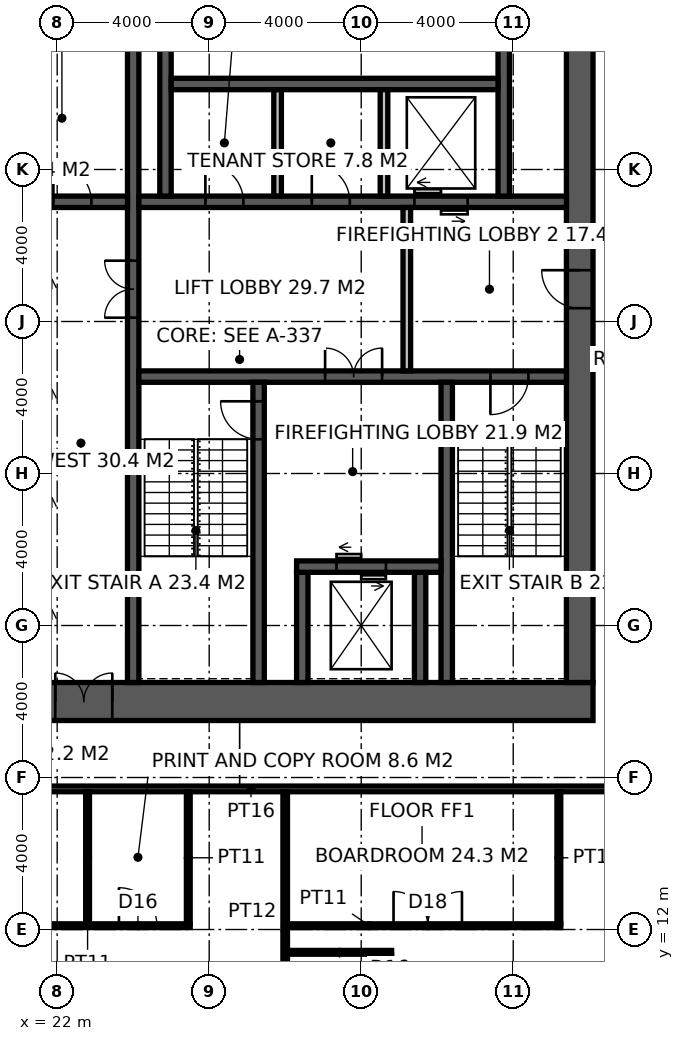
"""IFC4 building model, lengths in metres.
Left out: names, types, materials, properties, quantities, classifications, styles, units other than length and angle.
Written with IfcOpenShell. Run it as: python <this file> out.ifc"""

import sys

from ifc_helpers import new_model, si_unit, direction, frame, frame_2d, origin, place, context, subcontext, project, spatial, rectangle, extrude, element, fill, save


model = new_model("IFC4")
c1 = context("Model", 3, precision=1e-05, world=origin(), true_north=direction((0.0, 1.0)))
c2 = subcontext(c1, "Body", "Model", "MODEL_VIEW")
j1 = project(units=[si_unit("LENGTHUNIT", "METRE"), si_unit("PLANEANGLEUNIT", "RADIAN")], contexts=[c1])
p1 = place(None, origin())
s1 = spatial("IfcSite", under=j1, at=p1, CompositionType="ELEMENT")
p2 = place(p1, origin())
s2 = spatial("IfcBuilding", under=s1, at=p2, CompositionType="ELEMENT")
p3 = place(p2, frame((0.0, 0.0, 234.2)))
s3 = spatial("IfcBuildingStorey", under=s2, at=p3, CompositionType="ELEMENT", Elevation=234.2)
p4 = place(p3, frame((18.5, 18.0, -0.15), z_axis=(0.0, 0.0, 1.0), x_axis=(1.0, 0.0, 0.0)))
e1 = element("IfcWall", 1, at=p4, inside=s3, PredefinedType="SHEAR", context=c2, shape_type="SweptSolid", body=[
    extrude(rectangle(XDim=17.6, YDim=1.0, at=frame_2d((8.8, 0.0))), origin(), (0.0, 0.0, 1.0), 4.0),
])
p5 = place(p4, frame((3.45, 0.0, 0.15)))
e2 = element("IfcOpeningElement", 2, at=p5, cuts=e1, PredefinedType="OPENING", context=c2, shape_type="SweptSolid", body=[
    extrude(rectangle(XDim=1.5, YDim=2.4, at=frame_2d((0.75, 1.2))), frame((0.0, 0.51, 0.0), z_axis=(0.0, -1.0, 0.0), x_axis=(1.0, 0.0, 0.0)), (0.0, 0.0, 1.0), 1.02),
])
p6 = place(p3, frame((35.75, 18.5, -0.15), z_axis=(0.0, 0.0, 1.0), x_axis=(0.0, 1.0, 0.0)))
e3 = element("IfcWall", 3, at=p6, inside=s3, PredefinedType="SHEAR", context=c2, shape_type="SweptSolid", body=[
    extrude(rectangle(XDim=17.0, YDim=0.7, at=frame_2d((8.5, 0.0))), origin(), (0.0, 0.0, 1.0), 4.0),
])
p7 = place(p6, frame((9.85, 0.0, 0.15)))
e4 = element("IfcOpeningElement", 4, at=p7, cuts=e3, PredefinedType="OPENING", context=c2, shape_type="SweptSolid", body=[
    extrude(rectangle(XDim=1.0, YDim=2.2, at=frame_2d((0.5, 1.1))), frame((0.0, 0.36, 0.0), z_axis=(0.0, -1.0, 0.0), x_axis=(1.0, 0.0, 0.0)), (0.0, 0.0, 1.0), 0.72),
])
p8 = place(p3, frame((24.0, 18.5, -0.15), z_axis=(0.0, 0.0, 1.0), x_axis=(0.0, 1.0, 0.0)))
e5 = element("IfcWall", 5, at=p8, inside=s3, PredefinedType="SHEAR", context=c2, shape_type="SweptSolid", body=[
    extrude(rectangle(XDim=17.0, YDim=0.3, at=frame_2d((8.5, 0.0))), origin(), (0.0, 0.0, 1.0), 4.0),
])
p9 = place(p8, frame((9.6, 0.0, 0.15)))
e6 = element("IfcOpeningElement", 6, at=p9, cuts=e5, PredefinedType="OPENING", context=c2, shape_type="SweptSolid", body=[
    extrude(rectangle(XDim=1.5, YDim=2.4, at=frame_2d((0.75, 1.2))), frame((0.0, 0.16, 0.0), z_axis=(0.0, -1.0, 0.0), x_axis=(1.0, 0.0, 0.0)), (0.0, 0.0, 1.0), 0.32),
])
p10 = place(p3, frame((24.15, 26.55, -0.15), z_axis=(0.0, 0.0, 1.0), x_axis=(1.0, 0.0, 0.0)))
e7 = element("IfcWall", 7, at=p10, inside=s3, PredefinedType="SHEAR", context=c2, shape_type="SweptSolid", body=[
    extrude(rectangle(XDim=11.25, YDim=0.3, at=frame_2d((5.625, 0.0))), origin(), (0.0, 0.0, 1.0), 4.0),
])
p11 = place(p10, frame((9.25, 0.0, 0.15)))
e8 = element("IfcOpeningElement", 8, at=p11, cuts=e7, PredefinedType="OPENING", context=c2, shape_type="SweptSolid", body=[
    extrude(rectangle(XDim=1.0, YDim=2.2, at=frame_2d((0.5, 1.1))), frame((0.0, 0.16, 0.0), z_axis=(0.0, -1.0, 0.0), x_axis=(1.0, 0.0, 0.0)), (0.0, 0.0, 1.0), 0.32),
])
p12 = place(p10, frame((4.9, 0.0, 0.15)))
e9 = element("IfcOpeningElement", 9, at=p12, cuts=e7, PredefinedType="OPENING", context=c2, shape_type="SweptSolid", body=[
    extrude(rectangle(XDim=1.5, YDim=2.4, at=frame_2d((0.75, 1.2))), frame((0.0, 0.16, 0.0), z_axis=(0.0, -1.0, 0.0), x_axis=(1.0, 0.0, 0.0)), (0.0, 0.0, 1.0), 0.32),
])
p13 = place(p3, frame((27.3, 18.5, -0.15), z_axis=(0.0, 0.0, 1.0), x_axis=(0.0, 1.0, 0.0)))
e10 = element("IfcWall", 10, at=p13, inside=s3, PredefinedType="SHEAR", context=c2, shape_type="SweptSolid", body=[
    extrude(rectangle(XDim=7.9, YDim=0.3, at=frame_2d((3.95, 0.0))), origin(), (0.0, 0.0, 1.0), 4.0),
])
p14 = place(p13, frame((6.4, 0.0, 0.15)))
e11 = element("IfcOpeningElement", 11, at=p14, cuts=e10, PredefinedType="OPENING", context=c2, shape_type="SweptSolid", body=[
    extrude(rectangle(XDim=1.0, YDim=2.2, at=frame_2d((0.5, 1.1))), frame((0.0, 0.16, 0.0), z_axis=(0.0, -1.0, 0.0), x_axis=(1.0, 0.0, 0.0)), (0.0, 0.0, 1.0), 0.32),
])
p15 = place(p3, frame((32.25, 18.5, -0.15), z_axis=(0.0, 0.0, 1.0), x_axis=(0.0, 1.0, 0.0)))
e12 = element("IfcWall", 12, at=p15, inside=s3, PredefinedType="SHEAR", context=c2, shape_type="SweptSolid", body=[
    extrude(rectangle(XDim=7.9, YDim=0.3, at=frame_2d((3.95, 0.0))), origin(), (0.0, 0.0, 1.0), 4.0),
])
for number, where, z_axis, x_axis in (
    (13, (28.45, 18.5, -0.15), (0.0, 0.0, 1.0), (0.0, 1.0, 0.0)),
    (14, (31.55, 18.5, -0.15), (0.0, 0.0, 1.0), (0.0, 1.0, 0.0)),
):
    element("IfcWall", number, at=place(p3, frame(where, z_axis=z_axis, x_axis=x_axis)), inside=s3, PredefinedType="SHEAR", context=c2, shape_type="SweptSolid", body=[
        extrude(rectangle(XDim=2.9, YDim=0.3, at=frame_2d((1.45, 0.0))), origin(), (0.0, 0.0, 1.0), 4.0),
    ])
p16 = place(p3, frame((28.3, 21.55, -0.15), z_axis=(0.0, 0.0, 1.0), x_axis=(1.0, 0.0, 0.0)))
e15 = element("IfcWall", 15, at=p16, inside=s3, PredefinedType="SHEAR", context=c2, shape_type="SweptSolid", body=[
    extrude(rectangle(XDim=3.8, YDim=0.3, at=frame_2d((1.9, 0.0))), origin(), (0.0, 0.0, 1.0), 4.0),
])
p17 = place(p16, frame((1.05, 0.0, 0.15)))
e16 = element("IfcOpeningElement", 16, at=p17, cuts=e15, PredefinedType="OPENING", context=c2, shape_type="SweptSolid", body=[
    extrude(rectangle(XDim=1.3, YDim=2.4, at=frame_2d((0.65, 1.2))), frame((0.0, 0.16, 0.0), z_axis=(0.0, -1.0, 0.0), x_axis=(1.0, 0.0, 0.0)), (0.0, 0.0, 1.0), 0.32),
])
p18 = place(p3, frame((24.15, 31.15, -0.15), z_axis=(0.0, 0.0, 1.0), x_axis=(1.0, 0.0, 0.0)))
e17 = element("IfcWall", 17, at=p18, inside=s3, PredefinedType="SHEAR", context=c2, shape_type="SweptSolid", body=[
    extrude(rectangle(XDim=11.25, YDim=0.3, at=frame_2d((5.625, 0.0))), origin(), (0.0, 0.0, 1.0), 4.0),
])
p19 = place(p18, frame((1.75, 0.0, 0.15)))
e18 = element("IfcOpeningElement", 18, at=p19, cuts=e17, PredefinedType="OPENING", context=c2, shape_type="SweptSolid", body=[
    extrude(rectangle(XDim=1.0, YDim=2.2, at=frame_2d((0.5, 1.1))), frame((0.0, 0.16, 0.0), z_axis=(0.0, -1.0, 0.0), x_axis=(1.0, 0.0, 0.0)), (0.0, 0.0, 1.0), 0.32),
])
p20 = place(p18, frame((4.55, 0.0, 0.15)))
e19 = element("IfcOpeningElement", 19, at=p20, cuts=e17, PredefinedType="OPENING", context=c2, shape_type="SweptSolid", body=[
    extrude(rectangle(XDim=1.0, YDim=2.2, at=frame_2d((0.5, 1.1))), frame((0.0, 0.16, 0.0), z_axis=(0.0, -1.0, 0.0), x_axis=(1.0, 0.0, 0.0)), (0.0, 0.0, 1.0), 0.32),
])
p21 = place(p18, frame((7.25, 0.0, 0.15)))
e20 = element("IfcOpeningElement", 20, at=p21, cuts=e17, PredefinedType="OPENING", context=c2, shape_type="SweptSolid", body=[
    extrude(rectangle(XDim=1.4, YDim=2.4, at=frame_2d((0.7, 1.2))), frame((0.0, 0.16, 0.0), z_axis=(0.0, -1.0, 0.0), x_axis=(1.0, 0.0, 0.0)), (0.0, 0.0, 1.0), 0.32),
])
p22 = place(p3, frame((18.5, 31.15, -0.15), z_axis=(0.0, 0.0, 1.0), x_axis=(1.0, 0.0, 0.0)))
e21 = element("IfcWall", 21, at=p22, inside=s3, PredefinedType="SHEAR", context=c2, shape_type="SweptSolid", body=[
    extrude(rectangle(XDim=5.35, YDim=0.3, at=frame_2d((2.675, 0.0))), origin(), (0.0, 0.0, 1.0), 4.0),
])
p23 = place(p22, frame((3.4, 0.0, 0.15)))
e22 = element("IfcOpeningElement", 22, at=p23, cuts=e21, PredefinedType="OPENING", context=c2, shape_type="SweptSolid", body=[
    extrude(rectangle(XDim=1.0, YDim=2.2, at=frame_2d((0.5, 1.1))), frame((0.0, 0.16, 0.0), z_axis=(0.0, -1.0, 0.0), x_axis=(1.0, 0.0, 0.0)), (0.0, 0.0, 1.0), 0.32),
])
for number, where, z_axis, x_axis in (
    (23, (24.85, 31.3, -0.15), (0.0, 0.0, 1.0), (0.0, 1.0, 0.0)),
    (24, (33.75, 31.3, -0.15), (0.0, 0.0, 1.0), (0.0, 1.0, 0.0)),
):
    element("IfcWall", number, at=place(p3, frame(where, z_axis=z_axis, x_axis=x_axis)), inside=s3, PredefinedType="SHEAR", context=c2, shape_type="SweptSolid", body=[
        extrude(rectangle(XDim=4.2, YDim=0.3, at=frame_2d((2.1, 0.0))), origin(), (0.0, 0.0, 1.0), 4.0),
    ])
p24 = place(p3, frame((25.0, 34.25, -0.15), z_axis=(0.0, 0.0, 1.0), x_axis=(1.0, 0.0, 0.0)))
e25 = element("IfcWall", 25, at=p24, inside=s3, PredefinedType="SHEAR", context=c2, shape_type="SweptSolid", body=[
    extrude(rectangle(XDim=8.6, YDim=0.3, at=frame_2d((4.3, 0.0))), origin(), (0.0, 0.0, 1.0), 4.0),
])
for number, where, z_axis, x_axis in (
    (26, (27.8, 31.3, -0.15), (0.0, 0.0, 1.0), (0.0, 1.0, 0.0)),
    (27, (30.6, 31.3, -0.15), (0.0, 0.0, 1.0), (0.0, 1.0, 0.0)),
):
    element("IfcWall", number, at=place(p3, frame(where, z_axis=z_axis, x_axis=x_axis)), inside=s3, PredefinedType="SOLIDWALL", context=c2, shape_type="SweptSolid", body=[
        extrude(rectangle(XDim=2.8, YDim=0.2, at=frame_2d((1.4, 0.0))), origin(), (0.0, 0.0, 1.0), 4.0),
    ])
p25 = place(p3, frame((31.2, 26.7, 0.0), z_axis=(0.0, 0.0, 1.0), x_axis=(0.0, 1.0, 0.0)))
e28 = element("IfcWall", 28, at=p25, inside=s3, PredefinedType="SOLIDWALL", context=c2, shape_type="SweptSolid", body=[
    extrude(rectangle(XDim=4.3, YDim=0.2, at=frame_2d((2.15, 0.0))), origin(), (0.0, 0.0, 1.0), 3.85),
])
p26 = place(p3, frame((15.775, 15.7, 0.0), z_axis=(0.0, 0.0, 1.0), x_axis=(1.0, 0.0, 0.0)))
e29 = element("IfcWall", 29, at=p26, inside=s3, PredefinedType="PARTITIONING", context=c2, shape_type="SweptSolid", body=[
    extrude(rectangle(XDim=22.65, YDim=0.15, at=frame_2d((11.325, 0.0))), origin(), (0.0, 0.0, 1.0), 3.85),
])
p27 = place(p3, frame((28.0, 8.3, 0.0), z_axis=(0.0, 0.0, 1.0), x_axis=(0.0, 1.0, 0.0)))
e30 = element("IfcWall", 30, at=p27, inside=s3, PredefinedType="PARTITIONING", context=c2, shape_type="SweptSolid", body=[
    extrude(rectangle(XDim=7.325, YDim=0.12, at=frame_2d((3.663, 0.0))), origin(), (0.0, 0.0, 1.0), 3.85),
])
p28 = place(p3, frame((28.06, 11.4, 0.0), z_axis=(0.0, 0.0, 1.0), x_axis=(1.0, 0.0, 0.0)))
e31 = element("IfcWall", 31, at=p28, inside=s3, PredefinedType="PARTITIONING", context=c2, shape_type="SweptSolid", body=[
    extrude(rectangle(XDim=2.74, YDim=0.1, at=frame_2d((1.37, 0.0))), origin(), (0.0, 0.0, 1.0), 3.85),
])
p29 = place(p3, frame((15.65, 12.1, 0.0), z_axis=(0.0, 0.0, 1.0), x_axis=(1.0, 0.0, 0.0)))
e32 = element("IfcWall", 32, at=p29, inside=s3, PredefinedType="PARTITIONING", context=c2, shape_type="SweptSolid", body=[
    extrude(rectangle(XDim=9.85, YDim=0.1, at=frame_2d((4.925, 0.0))), origin(), (0.0, 0.0, 1.0), 3.85),
])
p30 = place(p29, frame((1.4, 0.0, 0.0)))
e33 = element("IfcOpeningElement", 33, at=p30, cuts=e32, PredefinedType="OPENING", context=c2, shape_type="SweptSolid", body=[
    extrude(rectangle(XDim=1.0, YDim=2.2, at=frame_2d((0.5, 1.1))), frame((0.0, 0.06, 0.0), z_axis=(0.0, -1.0, 0.0), x_axis=(1.0, 0.0, 0.0)), (0.0, 0.0, 1.0), 0.12),
])
p31 = place(p29, frame((4.95, 0.0, 0.0)))
e34 = element("IfcOpeningElement", 34, at=p31, cuts=e32, PredefinedType="OPENING", context=c2, shape_type="SweptSolid", body=[
    extrude(rectangle(XDim=1.0, YDim=2.2, at=frame_2d((0.5, 1.1))), frame((0.0, 0.06, 0.0), z_axis=(0.0, -1.0, 0.0), x_axis=(1.0, 0.0, 0.0)), (0.0, 0.0, 1.0), 0.12),
])
p32 = place(p29, frame((7.975, 0.0, 0.0)))
e35 = element("IfcOpeningElement", 35, at=p32, cuts=e32, PredefinedType="OPENING", context=c2, shape_type="SweptSolid", body=[
    extrude(rectangle(XDim=1.0, YDim=2.2, at=frame_2d((0.5, 1.1))), frame((0.0, 0.06, 0.0), z_axis=(0.0, -1.0, 0.0), x_axis=(1.0, 0.0, 0.0)), (0.0, 0.0, 1.0), 0.12),
])
p33 = place(p3, frame((28.061, 12.1, 0.0), z_axis=(0.0, 0.0, 1.0), x_axis=(1.0, 0.0, 0.0)))
e36 = element("IfcWall", 36, at=p33, inside=s3, PredefinedType="PARTITIONING", context=c2, shape_type="SweptSolid", body=[
    extrude(rectangle(XDim=7.19, YDim=0.1, at=frame_2d((3.595, 0.0))), origin(), (0.0, 0.0, 1.0), 3.85),
])
p34 = place(p33, frame((2.79, 0.0, 0.0)))
e37 = element("IfcOpeningElement", 37, at=p34, cuts=e36, PredefinedType="OPENING", context=c2, shape_type="SweptSolid", body=[
    extrude(rectangle(XDim=1.8, YDim=2.4, at=frame_2d((0.9, 1.2))), frame((0.0, 0.06, 0.0), z_axis=(0.0, -1.0, 0.0), x_axis=(1.0, 0.0, 0.0)), (0.0, 0.0, 1.0), 0.12),
])
p35 = place(p3, frame((22.8, 12.15, 0.0), z_axis=(0.0, 0.0, 1.0), x_axis=(0.0, 1.0, 0.0)))
e38 = element("IfcWall", 38, at=p35, inside=s3, PredefinedType="PARTITIONING", context=c2, shape_type="SweptSolid", body=[
    extrude(rectangle(XDim=3.475, YDim=0.1, at=frame_2d((1.738, 0.0))), origin(), (0.0, 0.0, 1.0), 3.85),
])
p36 = place(p3, frame((25.45, 12.15, 0.0), z_axis=(0.0, 0.0, 1.0), x_axis=(0.0, 1.0, 0.0)))
e39 = element("IfcWall", 39, at=p36, inside=s3, PredefinedType="PARTITIONING", context=c2, shape_type="SweptSolid", body=[
    extrude(rectangle(XDim=3.475, YDim=0.1, at=frame_2d((1.738, 0.0))), origin(), (0.0, 0.0, 1.0), 2.65),
])
p37 = place(p3, frame((30.75, 8.3, 0.0), z_axis=(0.0, 0.0, 1.0), x_axis=(0.0, 1.0, 0.0)))
e40 = element("IfcWall", 40, at=p37, inside=s3, PredefinedType="PARTITIONING", context=c2, shape_type="SweptSolid", body=[
    extrude(rectangle(XDim=3.05, YDim=0.1, at=frame_2d((1.525, 0.0))), origin(), (0.0, 0.0, 1.0), 3.85),
])
p38 = place(p37, frame((1.05, 0.0, 0.0)))
e41 = element("IfcOpeningElement", 41, at=p38, cuts=e40, PredefinedType="OPENING", context=c2, shape_type="SweptSolid", body=[
    extrude(rectangle(XDim=1.0, YDim=2.2, at=frame_2d((0.5, 1.1))), frame((0.0, 0.06, 0.0), z_axis=(0.0, -1.0, 0.0), x_axis=(1.0, 0.0, 0.0)), (0.0, 0.0, 1.0), 0.12),
])
p39 = place(p3, frame((35.201, 12.15, 0.0), z_axis=(0.0, 0.0, 1.0), x_axis=(0.0, 1.0, 0.0)))
e42 = element("IfcWall", 42, at=p39, inside=s3, PredefinedType="PARTITIONING", context=c2, shape_type="SweptSolid", body=[
    extrude(rectangle(XDim=3.475, YDim=0.1, at=frame_2d((1.738, 0.0))), origin(), (0.0, 0.0, 1.0), 3.85),
])
p40 = place(p14, origin())
e43 = element("IfcDoor", 43, at=p40, inside=s3, OperationType="SINGLE_SWING_RIGHT", PredefinedType="DOOR", context=c2, shape_type="SweptSolid", body=[
    extrude(rectangle(XDim=1.0, YDim=2.2, at=frame_2d((0.5, 1.1))), frame((0.0, 0.025, 0.0), z_axis=(0.0, -1.0, 0.0), x_axis=(1.0, 0.0, 0.0)), (0.0, 0.0, 1.0), 0.05),
])
fill(e11, e43)
p41 = place(p11, frame((1.0, 0.0, 0.0), z_axis=(0.0, 0.0, 1.0), x_axis=(-1.0, 0.0, 0.0)))
e44 = element("IfcDoor", 44, at=p41, inside=s3, OperationType="SINGLE_SWING_RIGHT", PredefinedType="DOOR", context=c2, shape_type="SweptSolid", body=[
    extrude(rectangle(XDim=1.0, YDim=2.2, at=frame_2d((0.5, 1.1))), frame((0.0, 0.025, 0.0), z_axis=(0.0, -1.0, 0.0), x_axis=(1.0, 0.0, 0.0)), (0.0, 0.0, 1.0), 0.05),
])
fill(e8, e44)
p42 = place(p7, origin())
e45 = element("IfcDoor", 45, at=p42, inside=s3, OperationType="SINGLE_SWING_RIGHT", PredefinedType="DOOR", context=c2, shape_type="SweptSolid", body=[
    extrude(rectangle(XDim=1.0, YDim=2.2, at=frame_2d((0.5, 1.1))), frame((0.0, 0.025, 0.0), z_axis=(0.0, -1.0, 0.0), x_axis=(1.0, 0.0, 0.0)), (0.0, 0.0, 1.0), 0.05),
])
fill(e4, e45)
p43 = place(p12, origin())
e46 = element("IfcDoor", 46, at=p43, inside=s3, OperationType="DOUBLE_DOOR_DOUBLE_SWING", PredefinedType="DOOR", context=c2, shape_type="SweptSolid", body=[
    extrude(rectangle(XDim=1.5, YDim=2.4, at=frame_2d((0.75, 1.2))), frame((0.0, 0.025, 0.0), z_axis=(0.0, -1.0, 0.0), x_axis=(1.0, 0.0, 0.0)), (0.0, 0.0, 1.0), 0.05),
])
fill(e9, e46)
p44 = place(p9, origin())
e47 = element("IfcDoor", 47, at=p44, inside=s3, OperationType="DOUBLE_DOOR_DOUBLE_SWING", PredefinedType="DOOR", context=c2, shape_type="SweptSolid", body=[
    extrude(rectangle(XDim=1.5, YDim=2.4, at=frame_2d((0.75, 1.2))), frame((0.0, 0.025, 0.0), z_axis=(0.0, -1.0, 0.0), x_axis=(1.0, 0.0, 0.0)), (0.0, 0.0, 1.0), 0.05),
])
fill(e6, e47)
p45 = place(p23, origin())
e48 = element("IfcDoor", 48, at=p45, inside=s3, OperationType="SINGLE_SWING_LEFT", PredefinedType="DOOR", context=c2, shape_type="SweptSolid", body=[
    extrude(rectangle(XDim=1.0, YDim=2.2, at=frame_2d((0.5, 1.1))), frame((0.0, 0.025, 0.0), z_axis=(0.0, -1.0, 0.0), x_axis=(1.0, 0.0, 0.0)), (0.0, 0.0, 1.0), 0.05),
])
fill(e22, e48)
p46 = place(p19, origin())
e49 = element("IfcDoor", 49, at=p46, inside=s3, OperationType="SINGLE_SWING_LEFT", PredefinedType="DOOR", context=c2, shape_type="SweptSolid", body=[
    extrude(rectangle(XDim=1.0, YDim=2.2, at=frame_2d((0.5, 1.1))), frame((0.0, 0.025, 0.0), z_axis=(0.0, -1.0, 0.0), x_axis=(1.0, 0.0, 0.0)), (0.0, 0.0, 1.0), 0.05),
])
fill(e18, e49)
p47 = place(p20, origin())
e50 = element("IfcDoor", 50, at=p47, inside=s3, OperationType="SINGLE_SWING_LEFT", PredefinedType="DOOR", context=c2, shape_type="SweptSolid", body=[
    extrude(rectangle(XDim=1.0, YDim=2.2, at=frame_2d((0.5, 1.1))), frame((0.0, 0.025, 0.0), z_axis=(0.0, -1.0, 0.0), x_axis=(1.0, 0.0, 0.0)), (0.0, 0.0, 1.0), 0.05),
])
fill(e19, e50)
p48 = place(p5, origin())
e51 = element("IfcDoor", 51, at=p48, inside=s3, OperationType="DOUBLE_DOOR_DOUBLE_SWING", PredefinedType="DOOR", context=c2, shape_type="SweptSolid", body=[
    extrude(rectangle(XDim=1.5, YDim=2.4, at=frame_2d((0.75, 1.2))), frame((0.0, 0.025, 0.0), z_axis=(0.0, -1.0, 0.0), x_axis=(1.0, 0.0, 0.0)), (0.0, 0.0, 1.0), 0.05),
])
fill(e2, e51)
p49 = place(p32, origin())
e52 = element("IfcDoor", 52, at=p49, inside=s3, OperationType="SINGLE_SWING_LEFT", PredefinedType="DOOR", context=c2, shape_type="SweptSolid", body=[
    extrude(rectangle(XDim=1.0, YDim=2.2, at=frame_2d((0.5, 1.1))), frame((0.0, 0.025, 0.0), z_axis=(0.0, -1.0, 0.0), x_axis=(1.0, 0.0, 0.0)), (0.0, 0.0, 1.0), 0.05),
])
fill(e35, e52)
p50 = place(p34, origin())
e53 = element("IfcDoor", 53, at=p50, inside=s3, OperationType="DOUBLE_DOOR_DOUBLE_SWING", PredefinedType="DOOR", context=c2, shape_type="SweptSolid", body=[
    extrude(rectangle(XDim=1.8, YDim=2.4, at=frame_2d((0.9, 1.2))), frame((0.0, 0.025, 0.0), z_axis=(0.0, -1.0, 0.0), x_axis=(1.0, 0.0, 0.0)), (0.0, 0.0, 1.0), 0.05),
])
fill(e37, e53)
p51 = place(p17, origin())
e54 = element("IfcDoor", 54, at=p51, inside=s3, OperationType="DOUBLE_DOOR_SLIDING", PredefinedType="DOOR", context=c2, shape_type="SweptSolid", body=[
    extrude(rectangle(XDim=1.3, YDim=2.4, at=frame_2d((0.65, 1.2))), frame((0.0, 0.025, 0.0), z_axis=(0.0, -1.0, 0.0), x_axis=(1.0, 0.0, 0.0)), (0.0, 0.0, 1.0), 0.05),
])
fill(e16, e54)
p52 = place(p21, origin())
e55 = element("IfcDoor", 55, at=p52, inside=s3, OperationType="DOUBLE_DOOR_SLIDING", PredefinedType="DOOR", context=c2, shape_type="SweptSolid", body=[
    extrude(rectangle(XDim=1.4, YDim=2.4, at=frame_2d((0.7, 1.2))), frame((0.0, 0.025, 0.0), z_axis=(0.0, -1.0, 0.0), x_axis=(1.0, 0.0, 0.0)), (0.0, 0.0, 1.0), 0.05),
])
fill(e20, e55)
save(model, sys.argv[1])
